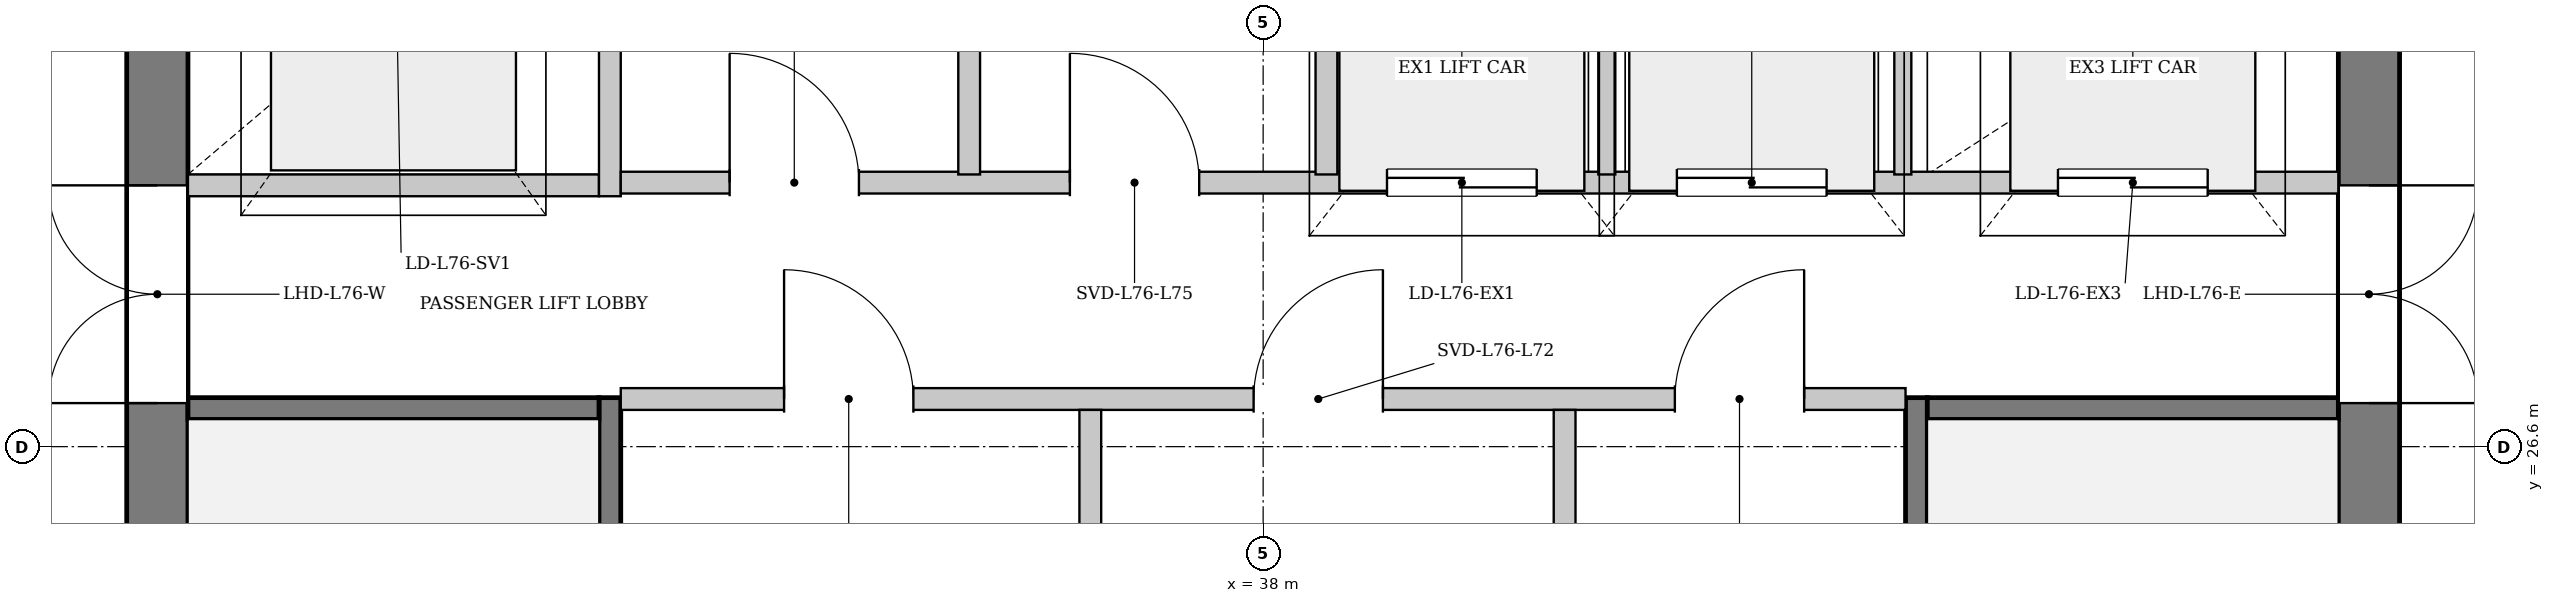
"""IFC4 building model, lengths in metres.
Left out: names, types, materials, properties, quantities, classifications, styles, units other than length and angle.
Written with IfcOpenShell. Run it as: python <this file> out.ifc"""

import sys

from ifc_helpers import new_model, si_unit, direction, frame, frame_2d, origin, place, context, subcontext, project, spatial, rectangle, extrude, source, transform, mapped, element, fill, save


model = new_model("IFC4")
c1 = context("Model", 3, precision=1e-05, world=origin(), true_north=direction((0.0, 1.0)))
c2 = subcontext(c1, "Body", "Model", "MODEL_VIEW")
j1 = project(units=[si_unit("LENGTHUNIT", "METRE"), si_unit("PLANEANGLEUNIT", "RADIAN")], contexts=[c1])
p1 = place(None, origin())
s1 = spatial("IfcSite", under=j1, at=p1, CompositionType="ELEMENT")
p2 = place(p1, origin())
s2 = spatial("IfcBuilding", under=s1, at=p2, CompositionType="ELEMENT")
p3 = place(p2, frame((0.0, 0.0, 286.1)))
s3 = spatial("IfcBuildingStorey", under=s2, at=p3, CompositionType="ELEMENT", Elevation=286.1)
p4 = place(p3, frame((29.875, 19.5, 0.0), z_axis=(0.0, 0.0, 1.0), x_axis=(0.0, 1.0, 0.0)))
e1 = element("IfcWall", 1, at=p4, inside=s3, PredefinedType="SHEAR", context=c2, shape_type="SweptSolid", body=[
    extrude(rectangle(XDim=14.2, YDim=0.45, at=frame_2d((7.1, 0.0))), origin(), (0.0, 0.0, 1.0), 4.12),
])
p5 = place(p4, frame((7.42, 0.0, 0.0)))
e2 = element("IfcOpeningElement", 2, at=p5, cuts=e1, PredefinedType="OPENING", context=c2, shape_type="SweptSolid", body=[
    extrude(rectangle(XDim=1.6, YDim=2.2, at=frame_2d((0.8, 1.1))), frame((0.0, 0.235, 0.0), z_axis=(0.0, -1.0, 0.0), x_axis=(1.0, 0.0, 0.0)), (0.0, 0.0, 1.0), 0.47),
])
p6 = place(p3, frame((46.125, 33.7, 0.0), z_axis=(0.0, 0.0, 1.0), x_axis=(0.0, -1.0, 0.0)))
e3 = element("IfcWall", 3, at=p6, inside=s3, PredefinedType="SHEAR", context=c2, shape_type="SweptSolid", body=[
    extrude(rectangle(XDim=14.2, YDim=0.45, at=frame_2d((7.1, 0.0))), origin(), (0.0, 0.0, 1.0), 4.12),
])
p7 = place(p6, frame((5.18, 0.0, 0.0)))
e4 = element("IfcOpeningElement", 4, at=p7, cuts=e3, PredefinedType="OPENING", context=c2, shape_type="SweptSolid", body=[
    extrude(rectangle(XDim=1.6, YDim=2.2, at=frame_2d((0.8, 1.1))), frame((0.0, 0.235, 0.0), z_axis=(0.0, -1.0, 0.0), x_axis=(1.0, 0.0, 0.0)), (0.0, 0.0, 1.0), 0.47),
])
p8 = place(p6, frame((2.05, 0.0, 0.0)))
e5 = element("IfcOpeningElement", 5, at=p8, cuts=e3, PredefinedType="OPENING", context=c2, shape_type="SweptSolid", body=[
    extrude(rectangle(XDim=0.95, YDim=2.1, at=frame_2d((0.475, 1.05))), frame((0.0, 0.235, 0.0), z_axis=(0.0, -1.0, 0.0), x_axis=(1.0, 0.0, 0.0)), (0.0, 0.0, 1.0), 0.47),
])
p9 = place(p3, frame((33.2, 19.5, 0.0), z_axis=(0.0, 0.0, 1.0), x_axis=(0.0, 1.0, 0.0)))
e6 = element("IfcWall", 6, at=p9, inside=s3, PredefinedType="PARTITIONING", context=c2, shape_type="SweptSolid", body=[
    extrude(rectangle(XDim=7.46, YDim=0.16, at=frame_2d((3.73, 0.0))), origin(), (0.0, 0.0, 1.0), 4.12),
])
p10 = place(p9, frame((0.08, 0.0, 0.0)))
e7 = element("IfcOpeningElement", 7, at=p10, cuts=e6, PredefinedType="OPENING", context=c2, shape_type="SweptSolid", body=[
    extrude(rectangle(XDim=1.32, YDim=2.2, at=frame_2d((0.66, 1.1))), frame((0.0, 0.09, 0.0), z_axis=(0.0, -1.0, 0.0), x_axis=(1.0, 0.0, 0.0)), (0.0, 0.0, 1.0), 0.18),
])
p11 = place(p3, frame((30.1, 26.88, 0.0), z_axis=(0.0, 0.0, 1.0), x_axis=(1.0, 0.0, 0.0)))
e8 = element("IfcWall", 8, at=p11, inside=s3, PredefinedType="PARTITIONING", context=c2, shape_type="SweptSolid", body=[
    extrude(rectangle(XDim=3.02, YDim=0.16, at=frame_2d((1.51, 0.0))), origin(), (0.0, 0.0, 1.0), 4.12),
])
p12 = place(p3, frame((42.8, 26.96, 0.0), z_axis=(0.0, 0.0, 1.0), x_axis=(0.0, -1.0, 0.0)))
e9 = element("IfcWall", 9, at=p12, inside=s3, PredefinedType="PARTITIONING", context=c2, shape_type="SweptSolid", body=[
    extrude(rectangle(XDim=7.46, YDim=0.16, at=frame_2d((3.73, 0.0))), origin(), (0.0, 0.0, 1.0), 4.12),
])
p13 = place(p12, frame((6.06, 0.0, 0.0)))
e10 = element("IfcOpeningElement", 10, at=p13, cuts=e9, PredefinedType="OPENING", context=c2, shape_type="SweptSolid", body=[
    extrude(rectangle(XDim=1.32, YDim=2.2, at=frame_2d((0.66, 1.1))), frame((0.0, 0.09, 0.0), z_axis=(0.0, -1.0, 0.0), x_axis=(1.0, 0.0, 0.0)), (0.0, 0.0, 1.0), 0.18),
])
for number, where, z_axis, x_axis in (
    (11, (42.88, 26.88, 0.0), (0.0, 0.0, 1.0), (1.0, 0.0, 0.0)),
    (12, (30.1, 28.52, 0.0), (0.0, 0.0, 1.0), (1.0, 0.0, 0.0)),
):
    element("IfcWall", number, at=place(p3, frame(where, z_axis=z_axis, x_axis=x_axis)), inside=s3, PredefinedType="PARTITIONING", context=c2, shape_type="SweptSolid", body=[
        extrude(rectangle(XDim=3.02, YDim=0.16, at=frame_2d((1.51, 0.0))), origin(), (0.0, 0.0, 1.0), 4.12),
    ])
p14 = place(p3, frame((33.2, 28.44, 0.0), z_axis=(0.0, 0.0, 1.0), x_axis=(0.0, 1.0, 0.0)))
e13 = element("IfcWall", 13, at=p14, inside=s3, PredefinedType="PARTITIONING", context=c2, shape_type="SweptSolid", body=[
    extrude(rectangle(XDim=5.26, YDim=0.16, at=frame_2d((2.63, 0.0))), origin(), (0.0, 0.0, 1.0), 4.12),
])
p15 = place(p3, frame((33.28, 26.95, 0.0), z_axis=(0.0, 0.0, 1.0), x_axis=(1.0, 0.0, 0.0)))
e14 = element("IfcWall", 14, at=p15, inside=s3, PredefinedType="PARTITIONING", context=c2, shape_type="SweptSolid", body=[
    extrude(rectangle(XDim=9.44, YDim=0.16, at=frame_2d((4.72, 0.0))), origin(), (0.0, 0.0, 1.0), 4.12),
])
p16 = place(p15, frame((1.2, 0.0, 0.0)))
e15 = element("IfcOpeningElement", 15, at=p16, cuts=e14, PredefinedType="OPENING", context=c2, shape_type="SweptSolid", body=[
    extrude(rectangle(XDim=0.95, YDim=2.1, at=frame_2d((0.475, 1.05))), frame((0.0, 0.09, 0.0), z_axis=(0.0, -1.0, 0.0), x_axis=(1.0, 0.0, 0.0)), (0.0, 0.0, 1.0), 0.18),
])
p17 = place(p15, frame((4.65, 0.0, 0.0)))
e16 = element("IfcOpeningElement", 16, at=p17, cuts=e14, PredefinedType="OPENING", context=c2, shape_type="SweptSolid", body=[
    extrude(rectangle(XDim=0.95, YDim=2.1, at=frame_2d((0.475, 1.05))), frame((0.0, 0.09, 0.0), z_axis=(0.0, -1.0, 0.0), x_axis=(1.0, 0.0, 0.0)), (0.0, 0.0, 1.0), 0.18),
])
p18 = place(p15, frame((7.745, 0.0, 0.0)))
e17 = element("IfcOpeningElement", 17, at=p18, cuts=e14, PredefinedType="OPENING", context=c2, shape_type="SweptSolid", body=[
    extrude(rectangle(XDim=0.95, YDim=2.1, at=frame_2d((0.475, 1.05))), frame((0.0, 0.09, 0.0), z_axis=(0.0, -1.0, 0.0), x_axis=(1.0, 0.0, 0.0)), (0.0, 0.0, 1.0), 0.18),
])
for number, where, z_axis, x_axis in (
    (18, (36.73, 24.56, 0.0), (0.0, 0.0, 1.0), (0.0, 1.0, 0.0)),
    (19, (40.215, 24.56, 0.0), (0.0, 0.0, 1.0), (0.0, 1.0, 0.0)),
):
    element("IfcWall", number, at=place(p3, frame(where, z_axis=z_axis, x_axis=x_axis)), inside=s3, PredefinedType="PARTITIONING", context=c2, shape_type="SweptSolid", body=[
        extrude(rectangle(XDim=2.31, YDim=0.16, at=frame_2d((1.155, 0.0))), origin(), (0.0, 0.0, 1.0), 4.12),
    ])
p19 = place(p3, frame((33.28, 28.54, 0.0), z_axis=(0.0, 0.0, 1.0), x_axis=(1.0, 0.0, 0.0)))
e20 = element("IfcWall", 20, at=p19, inside=s3, PredefinedType="PARTITIONING", context=c2, shape_type="SweptSolid", body=[
    extrude(rectangle(XDim=12.62, YDim=0.16, at=frame_2d((6.31, 0.0))), origin(), (0.0, 0.0, 1.0), 4.12),
])
p20 = place(p19, frame((0.8, 0.0, 0.0)))
e21 = element("IfcOpeningElement", 21, at=p20, cuts=e20, PredefinedType="OPENING", context=c2, shape_type="SweptSolid", body=[
    extrude(rectangle(XDim=0.95, YDim=2.1, at=frame_2d((0.475, 1.05))), frame((0.0, 0.09, 0.0), z_axis=(0.0, -1.0, 0.0), x_axis=(1.0, 0.0, 0.0)), (0.0, 0.0, 1.0), 0.18),
])
p21 = place(p19, frame((3.3, 0.0, 0.0)))
e22 = element("IfcOpeningElement", 22, at=p21, cuts=e20, PredefinedType="OPENING", context=c2, shape_type="SweptSolid", body=[
    extrude(rectangle(XDim=0.95, YDim=2.1, at=frame_2d((0.475, 1.05))), frame((0.0, 0.09, 0.0), z_axis=(0.0, -1.0, 0.0), x_axis=(1.0, 0.0, 0.0)), (0.0, 0.0, 1.0), 0.18),
])
p22 = place(p19, frame((5.63, 0.0, 0.0)))
e23 = element("IfcOpeningElement", 23, at=p22, cuts=e20, PredefinedType="OPENING", context=c2, shape_type="SweptSolid", body=[
    extrude(rectangle(XDim=1.1, YDim=2.2, at=frame_2d((0.55, 1.1))), frame((0.0, 0.09, 0.0), z_axis=(0.0, -1.0, 0.0), x_axis=(1.0, 0.0, 0.0)), (0.0, 0.0, 1.0), 0.18),
])
p23 = place(p19, frame((7.76, 0.0, 0.0)))
e24 = element("IfcOpeningElement", 24, at=p23, cuts=e20, PredefinedType="OPENING", context=c2, shape_type="SweptSolid", body=[
    extrude(rectangle(XDim=1.1, YDim=2.2, at=frame_2d((0.55, 1.1))), frame((0.0, 0.09, 0.0), z_axis=(0.0, -1.0, 0.0), x_axis=(1.0, 0.0, 0.0)), (0.0, 0.0, 1.0), 0.18),
])
p24 = place(p19, frame((10.56, 0.0, 0.0)))
e25 = element("IfcOpeningElement", 25, at=p24, cuts=e20, PredefinedType="OPENING", context=c2, shape_type="SweptSolid", body=[
    extrude(rectangle(XDim=1.1, YDim=2.2, at=frame_2d((0.55, 1.1))), frame((0.0, 0.09, 0.0), z_axis=(0.0, -1.0, 0.0), x_axis=(1.0, 0.0, 0.0)), (0.0, 0.0, 1.0), 0.18),
])
for number, where, z_axis, x_axis in (
    (26, (35.84, 28.6, 0.0), (0.0, 0.0, 1.0), (0.0, 1.0, 0.0)),
    (27, (38.465, 28.6, 0.0), (0.0, 0.0, 1.0), (0.0, 1.0, 0.0)),
):
    element("IfcWall", number, at=place(p3, frame(where, z_axis=z_axis, x_axis=x_axis)), inside=s3, PredefinedType="PARTITIONING", context=c2, shape_type="SweptSolid", body=[
        extrude(rectangle(XDim=1.92, YDim=0.16, at=frame_2d((0.96, 0.0))), origin(), (0.0, 0.0, 1.0), 4.12),
    ])
for number, where, z_axis, x_axis in (
    (28, (40.525, 28.6, 0.0), (0.0, 0.0, 1.0), (0.0, 1.0, 0.0)),
    (29, (42.7, 28.6, 0.0), (0.0, 0.0, 1.0), (0.0, 1.0, 0.0)),
):
    element("IfcWall", number, at=place(p3, frame(where, z_axis=z_axis, x_axis=x_axis)), inside=s3, PredefinedType="PARTITIONING", context=c2, shape_type="SweptSolid", body=[
        extrude(rectangle(XDim=1.92, YDim=0.125, at=frame_2d((0.96, 0.0))), origin(), (0.0, 0.0, 1.0), 4.12),
    ])
m1 = source(origin(), c2, "Body", "SweptSolid", [
    extrude(rectangle(XDim=1.6, YDim=2.2, at=frame_2d((0.8, 1.1))), frame((0.0, 0.025, 0.0), z_axis=(0.0, -1.0, 0.0), x_axis=(1.0, 0.0, 0.0)), (0.0, 0.0, 1.0), 0.05),
])
p25 = place(p5, origin())
e30 = element("IfcDoor", 30, at=p25, inside=s3, OperationType="DOUBLE_DOOR_SINGLE_SWING", PredefinedType="DOOR", context=c2, shape_type="MappedRepresentation", body=[
    mapped(m1, transform((0.0, 0.0, 0.0), x_axis=(1.0, 0.0, 0.0), y_axis=(0.0, 1.0, 0.0), z_axis=(0.0, 0.0, 1.0), scale=1.0)),
])
fill(e2, e30)
p26 = place(p7, origin())
e31 = element("IfcDoor", 31, at=p26, inside=s3, OperationType="DOUBLE_DOOR_SINGLE_SWING", PredefinedType="DOOR", context=c2, shape_type="MappedRepresentation", body=[
    mapped(m1, transform((0.0, 0.0, 0.0), x_axis=(1.0, 0.0, 0.0), y_axis=(0.0, 1.0, 0.0), z_axis=(0.0, 0.0, 1.0), scale=1.0)),
])
fill(e4, e31)
m2 = source(origin(), c2, "Body", "SweptSolid", [
    extrude(rectangle(XDim=0.95, YDim=2.1, at=frame_2d((0.475, 1.05))), frame((0.0, 0.025, 0.0), z_axis=(0.0, -1.0, 0.0), x_axis=(1.0, 0.0, 0.0)), (0.0, 0.0, 1.0), 0.05),
])
p27 = place(p16, origin())
e32 = element("IfcDoor", 32, at=p27, inside=s3, OperationType="SINGLE_SWING_LEFT", PredefinedType="DOOR", context=c2, shape_type="MappedRepresentation", body=[
    mapped(m2, transform((0.0, 0.0, 0.0), x_axis=(1.0, 0.0, 0.0), y_axis=(0.0, 1.0, 0.0), z_axis=(0.0, 0.0, 1.0), scale=1.0)),
])
fill(e15, e32)
p28 = place(p17, origin())
e33 = element("IfcDoor", 33, at=p28, inside=s3, OperationType="SINGLE_SWING_RIGHT", PredefinedType="DOOR", context=c2, shape_type="MappedRepresentation", body=[
    mapped(m2, transform((0.0, 0.0, 0.0), x_axis=(1.0, 0.0, 0.0), y_axis=(0.0, 1.0, 0.0), z_axis=(0.0, 0.0, 1.0), scale=1.0)),
])
fill(e16, e33)
p29 = place(p18, origin())
e34 = element("IfcDoor", 34, at=p29, inside=s3, OperationType="SINGLE_SWING_RIGHT", PredefinedType="DOOR", context=c2, shape_type="MappedRepresentation", body=[
    mapped(m2, transform((0.0, 0.0, 0.0), x_axis=(1.0, 0.0, 0.0), y_axis=(0.0, 1.0, 0.0), z_axis=(0.0, 0.0, 1.0), scale=1.0)),
])
fill(e17, e34)
p30 = place(p20, origin())
e35 = element("IfcDoor", 35, at=p30, inside=s3, OperationType="SINGLE_SWING_LEFT", PredefinedType="DOOR", context=c2, shape_type="MappedRepresentation", body=[
    mapped(m2, transform((0.0, 0.0, 0.0), x_axis=(1.0, 0.0, 0.0), y_axis=(0.0, 1.0, 0.0), z_axis=(0.0, 0.0, 1.0), scale=1.0)),
])
fill(e21, e35)
p31 = place(p21, origin())
e36 = element("IfcDoor", 36, at=p31, inside=s3, OperationType="SINGLE_SWING_LEFT", PredefinedType="DOOR", context=c2, shape_type="MappedRepresentation", body=[
    mapped(m2, transform((0.0, 0.0, 0.0), x_axis=(1.0, 0.0, 0.0), y_axis=(0.0, 1.0, 0.0), z_axis=(0.0, 0.0, 1.0), scale=1.0)),
])
fill(e22, e36)
m3 = source(origin(), c2, "Body", "SweptSolid", [
    extrude(rectangle(XDim=1.1, YDim=2.2, at=frame_2d((0.55, 1.1))), frame((0.0, 0.025, 0.0), z_axis=(0.0, -1.0, 0.0), x_axis=(1.0, 0.0, 0.0)), (0.0, 0.0, 1.0), 0.05),
])
p32 = place(p22, origin())
e37 = element("IfcDoor", 37, at=p32, inside=s3, OperationType="DOUBLE_DOOR_SLIDING", PredefinedType="DOOR", context=c2, shape_type="MappedRepresentation", body=[
    mapped(m3, transform((0.0, 0.0, 0.0), x_axis=(1.0, 0.0, 0.0), y_axis=(0.0, 1.0, 0.0), z_axis=(0.0, 0.0, 1.0), scale=1.0)),
])
fill(e23, e37)
p33 = place(p23, origin())
e38 = element("IfcDoor", 38, at=p33, inside=s3, OperationType="DOUBLE_DOOR_SLIDING", PredefinedType="DOOR", context=c2, shape_type="MappedRepresentation", body=[
    mapped(m3, transform((0.0, 0.0, 0.0), x_axis=(1.0, 0.0, 0.0), y_axis=(0.0, 1.0, 0.0), z_axis=(0.0, 0.0, 1.0), scale=1.0)),
])
fill(e24, e38)
p34 = place(p24, origin())
e39 = element("IfcDoor", 39, at=p34, inside=s3, OperationType="DOUBLE_DOOR_SLIDING", PredefinedType="DOOR", context=c2, shape_type="MappedRepresentation", body=[
    mapped(m3, transform((0.0, 0.0, 0.0), x_axis=(1.0, 0.0, 0.0), y_axis=(0.0, 1.0, 0.0), z_axis=(0.0, 0.0, 1.0), scale=1.0)),
])
fill(e25, e39)
save(model, sys.argv[1])
